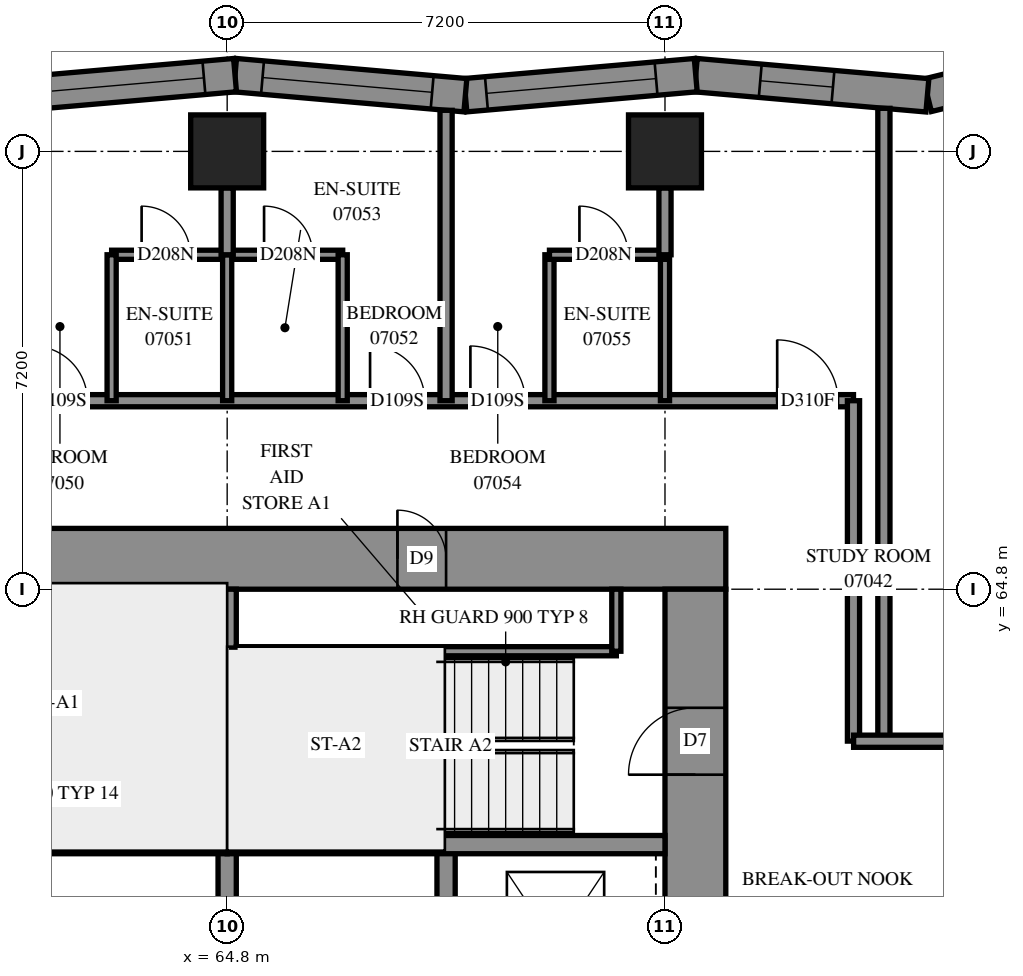
"""IFC4 building model, lengths in metres.
Left out: names, types, materials, properties, quantities, classifications, styles, units other than length and angle.
Written with IfcOpenShell. Run it as: python <this file> out.ifc"""

import sys

from ifc_helpers import new_model, si_unit, direction, frame, frame_2d, origin, origin_2d, place, context, subcontext, project, spatial, polyline, rectangle, outline, extrude, element, fill, save


model = new_model("IFC4")
c1 = context("Model", 3, precision=1e-05, world=origin(), true_north=direction((0.0, 1.0)))
c2 = subcontext(c1, "Body", "Model", "MODEL_VIEW")
j1 = project(units=[si_unit("LENGTHUNIT", "METRE"), si_unit("PLANEANGLEUNIT", "RADIAN")], contexts=[c1])
p1 = place(None, origin())
s1 = spatial("IfcSite", under=j1, at=p1, CompositionType="ELEMENT")
p2 = place(p1, origin())
s2 = spatial("IfcBuilding", under=s1, at=p2, CompositionType="ELEMENT")
p3 = place(p2, frame((0.0, 0.0, 30.4)))
s3 = spatial("IfcBuildingStorey", under=s2, at=p3, CompositionType="ELEMENT", Elevation=30.4)
for number, where, z_axis, x_axis in (
    (1, (64.8, 72.0, 0.0), (0.0, 0.0, 1.0), (1.0, 0.0, 0.0)),
    (2, (72.0, 72.0, 0.0), (0.0, 0.0, 1.0), (1.0, 0.0, 0.0)),
):
    element("IfcColumn", number, at=place(p3, frame(where, z_axis=z_axis, x_axis=x_axis)), inside=s3, PredefinedType="COLUMN", context=c2, shape_type="SweptSolid", body=[
        extrude(rectangle(XDim=1.2, YDim=1.2, at=origin_2d()), origin(), (0.0, 0.0, 1.0), 3.1),
    ])
p4 = place(p3, frame((56.6, 65.3, -0.3), z_axis=(0.0, 0.0, 1.0), x_axis=(1.0, 0.0, 0.0)))
e3 = element("IfcWall", 3, at=p4, inside=s3, PredefinedType="SHEAR", context=c2, shape_type="SweptSolid", body=[
    extrude(rectangle(XDim=16.4, YDim=1.0, at=frame_2d((8.2, 0.0))), origin(), (0.0, 0.0, 1.0), 2.7),
])
p5 = place(p4, frame((11.0, 0.0, 0.3)))
e4 = element("IfcOpeningElement", 4, at=p5, cuts=e3, PredefinedType="OPENING", context=c2, shape_type="SweptSolid", body=[
    extrude(rectangle(XDim=0.8, YDim=2.1, at=frame_2d((0.4, 1.05))), frame((0.0, 0.51, 0.0), z_axis=(0.0, -1.0, 0.0), x_axis=(1.0, 0.0, 0.0)), (0.0, 0.0, 1.0), 1.02),
])
p6 = place(p3, frame((72.5, 50.4, -0.3), z_axis=(0.0, 0.0, 1.0), x_axis=(0.0, 1.0, 0.0)))
e5 = element("IfcWall", 5, at=p6, inside=s3, PredefinedType="SHEAR", context=c2, shape_type="SweptSolid", body=[
    extrude(rectangle(XDim=14.4, YDim=1.0, at=frame_2d((7.2, 0.0))), origin(), (0.0, 0.0, 1.0), 2.7),
])
p7 = place(p6, frame((4.55, 0.0, 0.3)))
e6 = element("IfcOpeningElement", 6, at=p7, cuts=e5, PredefinedType="OPENING", context=c2, shape_type="SweptSolid", body=[
    extrude(rectangle(XDim=1.1, YDim=2.1, at=frame_2d((0.55, 1.05))), frame((0.0, 0.51, 0.0), z_axis=(0.0, -1.0, 0.0), x_axis=(1.0, 0.0, 0.0)), (0.0, 0.0, 1.0), 1.02),
])
p8 = place(p6, frame((11.35, 0.0, 0.3)))
e7 = element("IfcOpeningElement", 7, at=p8, cuts=e5, PredefinedType="OPENING", context=c2, shape_type="SweptSolid", body=[
    extrude(rectangle(XDim=1.1, YDim=2.1, at=frame_2d((0.55, 1.05))), frame((0.0, 0.51, 0.0), z_axis=(0.0, -1.0, 0.0), x_axis=(1.0, 0.0, 0.0)), (0.0, 0.0, 1.0), 1.02),
])
for number, where, z_axis, x_axis in (
    (8, (64.8, 57.3, 0.0), (0.0, 0.0, 1.0), (0.0, 1.0, 0.0)),
    (9, (68.4, 57.3, 0.0), (0.0, 0.0, 1.0), (0.0, 1.0, 0.0)),
):
    element("IfcWall", number, at=place(p3, frame(where, z_axis=z_axis, x_axis=x_axis)), inside=s3, PredefinedType="SOLIDWALL", context=c2, shape_type="SweptSolid", body=[
        extrude(rectangle(XDim=3.3, YDim=0.3, at=frame_2d((1.65, 0.0))), origin(), (0.0, 0.0, 1.0), 3.1),
    ])
for number, where, z_axis, x_axis in (
    (10, (57.6, 60.6, 0.0), (0.0, 0.0, 1.0), (1.0, 0.0, 0.0)),
    (11, (64.8, 60.6, 0.0), (0.0, 0.0, 1.0), (1.0, 0.0, 0.0)),
):
    element("IfcWall", number, at=place(p3, frame(where, z_axis=z_axis, x_axis=x_axis)), inside=s3, PredefinedType="SOLIDWALL", context=c2, shape_type="SweptSolid", body=[
        extrude(rectangle(XDim=7.2, YDim=0.3, at=frame_2d((3.6, 0.0))), origin(), (0.0, 0.0, 1.0), 3.1),
    ])
p9 = place(p3, frame((64.8, 60.6, 0.0), z_axis=(0.0, 0.0, 1.0), x_axis=(0.0, 1.0, 0.0)))
e12 = element("IfcWall", 12, at=p9, inside=s3, PredefinedType="SOLIDWALL", context=c2, shape_type="SweptSolid", body=[
    extrude(rectangle(XDim=4.2, YDim=0.3, at=frame_2d((2.1, 0.0))), origin(), (0.0, 0.0, 1.0), 3.1),
])
p10 = place(p3, frame((76.301, 49.443, -0.3), z_axis=(0.0, 0.0, 1.0), x_axis=(0.7071067812, 0.7071067812, 0.0)))
e13 = element("IfcWall", 13, at=p10, inside=s3, PredefinedType="SHEAR", context=c2, shape_type="SweptSolid", body=[
    extrude(rectangle(XDim=14.4, YDim=1.0, at=frame_2d((7.2, 0.0))), origin(), (0.0, 0.0, 1.0), 2.7),
])
p11 = place(p10, frame((4.55, 0.0, 0.3)))
e14 = element("IfcOpeningElement", 14, at=p11, cuts=e13, PredefinedType="OPENING", context=c2, shape_type="SweptSolid", body=[
    extrude(rectangle(XDim=1.1, YDim=2.1, at=frame_2d((0.55, 1.05))), frame((0.0, 0.51, 0.0), z_axis=(0.0, -1.0, 0.0), x_axis=(1.0, 0.0, 0.0)), (0.0, 0.0, 1.0), 1.02),
])
p12 = place(p10, frame((11.35, 0.0, 0.3)))
e15 = element("IfcOpeningElement", 15, at=p12, cuts=e13, PredefinedType="OPENING", context=c2, shape_type="SweptSolid", body=[
    extrude(rectangle(XDim=1.1, YDim=2.1, at=frame_2d((0.55, 1.05))), frame((0.0, 0.51, 0.0), z_axis=(0.0, -1.0, 0.0), x_axis=(1.0, 0.0, 0.0)), (0.0, 0.0, 1.0), 1.02),
])
p13 = place(p3, frame((79.947, 73.814, 0.0), z_axis=(0.0, 0.0, 1.0), x_axis=(-0.9711610885, -0.2384242862, 0.0)))
e16 = element("IfcWall", 16, at=p13, inside=s3, PredefinedType="SOLIDWALL", context=c2, shape_type="SweptSolid", body=[
    extrude(outline(polyline([(-0.207, -0.275), (3.694, -0.275), (3.785, 0.275), (0.207, 0.275), (-0.207, -0.275)])), origin(), (0.0, 0.0, 1.0), 3.1),
])
p14 = place(p13, frame((1.554, 0.0, 0.5)))
e17 = element("IfcOpeningElement", 17, at=p14, cuts=e16, PredefinedType="OPENING", context=c2, shape_type="SweptSolid", body=[
    extrude(rectangle(XDim=1.2, YDim=2.45, at=frame_2d((0.6, 1.225))), frame((0.0, 0.285, 0.0), z_axis=(0.0, -1.0, 0.0), x_axis=(1.0, 0.0, 0.0)), (0.0, 0.0, 1.0), 0.57),
])
p15 = place(p3, frame((76.316, 72.922, 0.0), z_axis=(0.0, 0.0, 1.0), x_axis=(-0.9962265436, 0.0867909782, 0.0)))
e18 = element("IfcWall", 18, at=p15, inside=s3, PredefinedType="SOLIDWALL", context=c2, shape_type="SweptSolid", body=[
    extrude(outline(polyline([(0.045, -0.275), (3.848, -0.275), (3.8, 0.275), (-0.045, 0.275), (0.045, -0.275)])), origin(), (0.0, 0.0, 1.0), 3.1),
])
p16 = place(p15, frame((1.559, 0.0, 0.5)))
e19 = element("IfcOpeningElement", 19, at=p16, cuts=e18, PredefinedType="OPENING", context=c2, shape_type="SweptSolid", body=[
    extrude(rectangle(XDim=1.2, YDim=2.45, at=frame_2d((0.6, 1.225))), frame((0.0, 0.285, 0.0), z_axis=(0.0, -1.0, 0.0), x_axis=(1.0, 0.0, 0.0)), (0.0, 0.0, 1.0), 0.57),
])
p17 = place(p3, frame((72.506, 73.254, 0.0), z_axis=(0.0, 0.0, 1.0), x_axis=(-0.9962273538, -0.0867816769, 0.0)))
e20 = element("IfcWall", 20, at=p17, inside=s3, PredefinedType="SOLIDWALL", context=c2, shape_type="SweptSolid", body=[
    extrude(outline(polyline([(-0.024, -0.275), (3.779, -0.275), (3.827, 0.275), (0.024, 0.275), (-0.024, -0.275)])), origin(), (0.0, 0.0, 1.0), 3.1),
])
p18 = place(p17, frame((0.655, 0.0, 0.5)))
e21 = element("IfcOpeningElement", 21, at=p18, cuts=e20, PredefinedType="OPENING", context=c2, shape_type="SweptSolid", body=[
    extrude(rectangle(XDim=2.8, YDim=2.45, at=frame_2d((1.4, 1.225))), frame((0.0, 0.285, 0.0), z_axis=(0.0, -1.0, 0.0), x_axis=(1.0, 0.0, 0.0)), (0.0, 0.0, 1.0), 0.57),
])
p19 = place(p3, frame((68.718, 72.924, 0.0), z_axis=(0.0, 0.0, 1.0), x_axis=(-0.9962273538, 0.0867816769, 0.0)))
e22 = element("IfcWall", 22, at=p19, inside=s3, PredefinedType="SOLIDWALL", context=c2, shape_type="SweptSolid", body=[
    extrude(outline(polyline([(0.024, -0.275), (3.827, -0.275), (3.779, 0.275), (-0.024, 0.275), (0.024, -0.275)])), origin(), (0.0, 0.0, 1.0), 3.1),
])
p20 = place(p19, frame((0.549, 0.0, 0.5)))
e23 = element("IfcOpeningElement", 23, at=p20, cuts=e22, PredefinedType="OPENING", context=c2, shape_type="SweptSolid", body=[
    extrude(rectangle(XDim=2.8, YDim=2.45, at=frame_2d((1.4, 1.225))), frame((0.0, 0.285, 0.0), z_axis=(0.0, -1.0, 0.0), x_axis=(1.0, 0.0, 0.0)), (0.0, 0.0, 1.0), 0.57),
])
p21 = place(p3, frame((64.929, 73.254, 0.0), z_axis=(0.0, 0.0, 1.0), x_axis=(-0.9962271558, -0.0867839505, 0.0)))
e24 = element("IfcWall", 24, at=p21, inside=s3, PredefinedType="SOLIDWALL", context=c2, shape_type="SweptSolid", body=[
    extrude(outline(polyline([(-0.024, -0.275), (3.779, -0.275), (3.827, 0.275), (0.024, 0.275), (-0.024, -0.275)])), origin(), (0.0, 0.0, 1.0), 3.1),
])
p22 = place(p21, frame((0.513, 0.0, 0.5)))
e25 = element("IfcOpeningElement", 25, at=p22, cuts=e24, PredefinedType="OPENING", context=c2, shape_type="SweptSolid", body=[
    extrude(rectangle(XDim=2.8, YDim=2.45, at=frame_2d((1.4, 1.225))), frame((0.0, 0.285, 0.0), z_axis=(0.0, -1.0, 0.0), x_axis=(1.0, 0.0, 0.0)), (0.0, 0.0, 1.0), 0.57),
])
p23 = place(p3, frame((64.95, 63.78, 0.0), z_axis=(0.0, 0.0, 1.0), x_axis=(1.0, 0.0, 0.0)))
e26 = element("IfcWall", 26, at=p23, inside=s3, PredefinedType="PARTITIONING", context=c2, shape_type="SweptSolid", body=[
    extrude(rectangle(XDim=6.25, YDim=0.15, at=frame_2d((3.125, 0.0))), origin(), (0.0, 0.0, 1.0), 3.1),
])
p24 = place(p3, frame((71.2, 63.78, 0.0), z_axis=(0.0, 0.0, 1.0), x_axis=(0.0, 1.0, 0.0)))
e27 = element("IfcWall", 27, at=p24, inside=s3, PredefinedType="PARTITIONING", context=c2, shape_type="SweptSolid", body=[
    extrude(rectangle(XDim=1.02, YDim=0.15, at=frame_2d((0.51, 0.0))), origin(), (0.0, 0.0, 1.0), 3.1),
])
p25 = place(p3, frame((54.5, 67.9, 0.0), z_axis=(0.0, 0.0, 1.0), x_axis=(1.0, 0.0, 0.0)))
e28 = element("IfcWall", 28, at=p25, inside=s3, PredefinedType="PARTITIONING", context=c2, shape_type="SweptSolid", body=[
    extrude(rectangle(XDim=20.6, YDim=0.2, at=frame_2d((10.3, 0.0))), origin(), (0.0, 0.0, 1.0), 3.1),
])
p26 = place(p25, frame((0.255, 0.0, 0.0)))
e29 = element("IfcOpeningElement", 29, at=p26, cuts=e28, PredefinedType="OPENING", context=c2, shape_type="SweptSolid", body=[
    extrude(rectangle(XDim=1.0, YDim=2.1, at=frame_2d((0.5, 1.05))), frame((0.0, 0.11, 0.0), z_axis=(0.0, -1.0, 0.0), x_axis=(1.0, 0.0, 0.0)), (0.0, 0.0, 1.0), 0.22),
])
p27 = place(p25, frame((19.345, 0.0, 0.0)))
e30 = element("IfcOpeningElement", 30, at=p27, cuts=e28, PredefinedType="OPENING", context=c2, shape_type="SweptSolid", body=[
    extrude(rectangle(XDim=1.0, YDim=2.1, at=frame_2d((0.5, 1.05))), frame((0.0, 0.11, 0.0), z_axis=(0.0, -1.0, 0.0), x_axis=(1.0, 0.0, 0.0)), (0.0, 0.0, 1.0), 0.22),
])
p28 = place(p25, frame((5.45, 0.0, 0.0)))
e31 = element("IfcOpeningElement", 31, at=p28, cuts=e28, PredefinedType="OPENING", context=c2, shape_type="SweptSolid", body=[
    extrude(rectangle(XDim=0.9, YDim=2.1, at=frame_2d((0.45, 1.05))), frame((0.0, 0.11, 0.0), z_axis=(0.0, -1.0, 0.0), x_axis=(1.0, 0.0, 0.0)), (0.0, 0.0, 1.0), 0.22),
])
p29 = place(p25, frame((7.1, 0.0, 0.0)))
e32 = element("IfcOpeningElement", 32, at=p29, cuts=e28, PredefinedType="OPENING", context=c2, shape_type="SweptSolid", body=[
    extrude(rectangle(XDim=0.9, YDim=2.1, at=frame_2d((0.45, 1.05))), frame((0.0, 0.11, 0.0), z_axis=(0.0, -1.0, 0.0), x_axis=(1.0, 0.0, 0.0)), (0.0, 0.0, 1.0), 0.22),
])
p30 = place(p25, frame((12.65, 0.0, 0.0)))
e33 = element("IfcOpeningElement", 33, at=p30, cuts=e28, PredefinedType="OPENING", context=c2, shape_type="SweptSolid", body=[
    extrude(rectangle(XDim=0.9, YDim=2.1, at=frame_2d((0.45, 1.05))), frame((0.0, 0.11, 0.0), z_axis=(0.0, -1.0, 0.0), x_axis=(1.0, 0.0, 0.0)), (0.0, 0.0, 1.0), 0.22),
])
p31 = place(p25, frame((14.3, 0.0, 0.0)))
e34 = element("IfcOpeningElement", 34, at=p31, cuts=e28, PredefinedType="OPENING", context=c2, shape_type="SweptSolid", body=[
    extrude(rectangle(XDim=0.9, YDim=2.1, at=frame_2d((0.45, 1.05))), frame((0.0, 0.11, 0.0), z_axis=(0.0, -1.0, 0.0), x_axis=(1.0, 0.0, 0.0)), (0.0, 0.0, 1.0), 0.22),
])
p32 = place(p3, frame((75.6, 62.3, 0.0), z_axis=(0.0, 0.0, 1.0), x_axis=(0.0, 1.0, 0.0)))
e35 = element("IfcWall", 35, at=p32, inside=s3, PredefinedType="PARTITIONING", context=c2, shape_type="SweptSolid", body=[
    extrude(rectangle(XDim=10.408, YDim=0.2, at=frame_2d((5.204, 0.0))), origin(), (0.0, 0.0, 1.0), 3.1),
])
p33 = place(p3, frame((75.1, 62.302, 0.0), z_axis=(0.0, 0.0, 1.0), x_axis=(0.0, 1.0, 0.0)))
e36 = element("IfcWall", 36, at=p33, inside=s3, PredefinedType="PARTITIONING", context=c2, shape_type="SweptSolid", body=[
    extrude(rectangle(XDim=5.598, YDim=0.2, at=frame_2d((2.799, 0.0))), origin(), (0.0, 0.0, 1.0), 3.1),
])
p34 = place(p3, frame((68.4, 67.9, 0.0), z_axis=(0.0, 0.0, 1.0), x_axis=(0.0, 1.0, 0.0)))
e37 = element("IfcWall", 37, at=p34, inside=s3, PredefinedType="PARTITIONING", context=c2, shape_type="SweptSolid", body=[
    extrude(rectangle(XDim=4.776, YDim=0.2, at=frame_2d((2.388, 0.0))), origin(), (0.0, 0.0, 1.0), 3.1),
])
p35 = place(p3, frame((75.102, 62.3, 0.0), z_axis=(0.0, 0.0, 1.0), x_axis=(1.0, 0.0, 0.0)))
e38 = element("IfcWall", 38, at=p35, inside=s3, PredefinedType="PARTITIONING", context=c2, shape_type="SweptSolid", body=[
    extrude(rectangle(XDim=4.098, YDim=0.2, at=frame_2d((2.049, 0.0))), origin(), (0.0, 0.0, 1.0), 3.1),
])
p36 = place(p3, frame((62.9, 70.3, 0.0), z_axis=(0.0, 0.0, 1.0), x_axis=(1.0, 0.0, 0.0)))
e39 = element("IfcWall", 39, at=p36, inside=s3, PredefinedType="PARTITIONING", context=c2, shape_type="SweptSolid", body=[
    extrude(rectangle(XDim=3.8, YDim=0.15, at=frame_2d((1.9, 0.0))), origin(), (0.0, 0.0, 1.0), 3.1),
])
p37 = place(p36, frame((0.493, 0.0, 0.0)))
e40 = element("IfcOpeningElement", 40, at=p37, cuts=e39, PredefinedType="OPENING", context=c2, shape_type="SweptSolid", body=[
    extrude(rectangle(XDim=0.8, YDim=2.1, at=frame_2d((0.4, 1.05))), frame((0.0, 0.085, 0.0), z_axis=(0.0, -1.0, 0.0), x_axis=(1.0, 0.0, 0.0)), (0.0, 0.0, 1.0), 0.17),
])
p38 = place(p36, frame((2.507, 0.0, 0.0)))
e41 = element("IfcOpeningElement", 41, at=p38, cuts=e39, PredefinedType="OPENING", context=c2, shape_type="SweptSolid", body=[
    extrude(rectangle(XDim=0.8, YDim=2.1, at=frame_2d((0.4, 1.05))), frame((0.0, 0.085, 0.0), z_axis=(0.0, -1.0, 0.0), x_axis=(1.0, 0.0, 0.0)), (0.0, 0.0, 1.0), 0.17),
])
for number, where, z_axis, x_axis in (
    (42, (62.9, 67.9, 0.0), (0.0, 0.0, 1.0), (0.0, 1.0, 0.0)),
    (43, (66.7, 67.9, 0.0), (0.0, 0.0, 1.0), (0.0, 1.0, 0.0)),
    (44, (64.8, 67.9, 0.0), (0.0, 0.0, 1.0), (0.0, 1.0, 0.0)),
    (45, (70.1, 67.9, 0.0), (0.0, 0.0, 1.0), (0.0, 1.0, 0.0)),
    (46, (72.0, 67.9, 0.0), (0.0, 0.0, 1.0), (0.0, 1.0, 0.0)),
):
    element("IfcWall", number, at=place(p3, frame(where, z_axis=z_axis, x_axis=x_axis)), inside=s3, PredefinedType="PARTITIONING", context=c2, shape_type="SweptSolid", body=[
        extrude(rectangle(XDim=2.4, YDim=0.15, at=frame_2d((1.2, 0.0))), origin(), (0.0, 0.0, 1.0), 3.1),
    ])
p39 = place(p3, frame((70.1, 70.3, 0.0), z_axis=(0.0, 0.0, 1.0), x_axis=(1.0, 0.0, 0.0)))
e47 = element("IfcWall", 47, at=p39, inside=s3, PredefinedType="PARTITIONING", context=c2, shape_type="SweptSolid", body=[
    extrude(rectangle(XDim=1.9, YDim=0.15, at=frame_2d((0.95, 0.0))), origin(), (0.0, 0.0, 1.0), 3.1),
])
p40 = place(p39, frame((0.493, 0.0, 0.0)))
e48 = element("IfcOpeningElement", 48, at=p40, cuts=e47, PredefinedType="OPENING", context=c2, shape_type="SweptSolid", body=[
    extrude(rectangle(XDim=0.8, YDim=2.1, at=frame_2d((0.4, 1.05))), frame((0.0, 0.085, 0.0), z_axis=(0.0, -1.0, 0.0), x_axis=(1.0, 0.0, 0.0)), (0.0, 0.0, 1.0), 0.17),
])
for number, where, z_axis, x_axis in (
    (49, (64.8, 70.3, 0.0), (0.0, 0.0, 1.0), (0.0, 1.0, 0.0)),
    (50, (72.0, 70.3, 0.0), (0.0, 0.0, 1.0), (0.0, 1.0, 0.0)),
):
    element("IfcWall", number, at=place(p3, frame(where, z_axis=z_axis, x_axis=x_axis)), inside=s3, PredefinedType="PARTITIONING", context=c2, shape_type="SweptSolid", body=[
        extrude(rectangle(XDim=1.1, YDim=0.2, at=frame_2d((0.55, 0.0))), origin(), (0.0, 0.0, 1.0), 3.1),
    ])
p41 = place(p16, origin())
e51 = element("IfcWindow", 51, at=p41, inside=s3, PartitioningType="SINGLE_PANEL", PredefinedType="WINDOW", context=c2, shape_type="SweptSolid", body=[
    extrude(rectangle(XDim=1.2, YDim=2.45, at=frame_2d((0.6, 1.225))), frame((0.0, 0.155, 0.0), z_axis=(0.0, -1.0, 0.0), x_axis=(1.0, 0.0, 0.0)), (0.0, 0.0, 1.0), 0.06),
])
fill(e19, e51)
p42 = place(p18, origin())
e52 = element("IfcWindow", 52, at=p42, inside=s3, PartitioningType="SINGLE_PANEL", PredefinedType="WINDOW", context=c2, shape_type="SweptSolid", body=[
    extrude(rectangle(XDim=2.8, YDim=2.45, at=frame_2d((1.4, 1.225))), frame((0.0, 0.155, 0.0), z_axis=(0.0, -1.0, 0.0), x_axis=(1.0, 0.0, 0.0)), (0.0, 0.0, 1.0), 0.06),
])
fill(e21, e52)
p43 = place(p20, origin())
e53 = element("IfcWindow", 53, at=p43, inside=s3, PartitioningType="SINGLE_PANEL", PredefinedType="WINDOW", context=c2, shape_type="SweptSolid", body=[
    extrude(rectangle(XDim=2.8, YDim=2.45, at=frame_2d((1.4, 1.225))), frame((0.0, 0.155, 0.0), z_axis=(0.0, -1.0, 0.0), x_axis=(1.0, 0.0, 0.0)), (0.0, 0.0, 1.0), 0.06),
])
fill(e23, e53)
p44 = place(p22, origin())
e54 = element("IfcWindow", 54, at=p44, inside=s3, PartitioningType="SINGLE_PANEL", PredefinedType="WINDOW", context=c2, shape_type="SweptSolid", body=[
    extrude(rectangle(XDim=2.8, YDim=2.45, at=frame_2d((1.4, 1.225))), frame((0.0, 0.155, 0.0), z_axis=(0.0, -1.0, 0.0), x_axis=(1.0, 0.0, 0.0)), (0.0, 0.0, 1.0), 0.06),
])
fill(e25, e54)
p45 = place(p5, origin())
e55 = element("IfcDoor", 55, at=p45, inside=s3, OperationType="SINGLE_SWING_RIGHT", PredefinedType="DOOR", context=c2, shape_type="SweptSolid", body=[
    extrude(rectangle(XDim=0.8, YDim=2.1, at=frame_2d((0.4, 1.05))), frame((0.0, -0.44, 0.0), z_axis=(0.0, -1.0, 0.0), x_axis=(1.0, 0.0, 0.0)), (0.0, 0.0, 1.0), 0.05),
])
fill(e4, e55)
p46 = place(p8, origin())
e56 = element("IfcDoor", 56, at=p46, inside=s3, OperationType="SINGLE_SWING_RIGHT", PredefinedType="DOOR", context=c2, shape_type="SweptSolid", body=[
    extrude(rectangle(XDim=1.1, YDim=2.1, at=frame_2d((0.55, 1.05))), frame((0.0, 0.025, 0.0), z_axis=(0.0, -1.0, 0.0), x_axis=(1.0, 0.0, 0.0)), (0.0, 0.0, 1.0), 0.05),
])
fill(e7, e56)
p47 = place(p27, origin())
e57 = element("IfcDoor", 57, at=p47, inside=s3, OperationType="SINGLE_SWING_RIGHT", PredefinedType="DOOR", context=c2, shape_type="SweptSolid", body=[
    extrude(rectangle(XDim=1.0, YDim=2.1, at=frame_2d((0.5, 1.05))), frame((0.0, 0.025, 0.0), z_axis=(0.0, -1.0, 0.0), x_axis=(1.0, 0.0, 0.0)), (0.0, 0.0, 1.0), 0.05),
])
fill(e30, e57)
p48 = place(p29, origin())
e58 = element("IfcDoor", 58, at=p48, inside=s3, OperationType="SINGLE_SWING_LEFT", PredefinedType="DOOR", context=c2, shape_type="SweptSolid", body=[
    extrude(rectangle(XDim=0.9, YDim=2.1, at=frame_2d((0.45, 1.05))), frame((0.0, 0.025, 0.0), z_axis=(0.0, -1.0, 0.0), x_axis=(1.0, 0.0, 0.0)), (0.0, 0.0, 1.0), 0.05),
])
fill(e32, e58)
p49 = place(p37, origin())
e59 = element("IfcDoor", 59, at=p49, inside=s3, OperationType="SINGLE_SWING_RIGHT", PredefinedType="DOOR", context=c2, shape_type="SweptSolid", body=[
    extrude(rectangle(XDim=0.8, YDim=2.1, at=frame_2d((0.4, 1.05))), frame((0.0, 0.025, 0.0), z_axis=(0.0, -1.0, 0.0), x_axis=(1.0, 0.0, 0.0)), (0.0, 0.0, 1.0), 0.05),
])
fill(e40, e59)
p50 = place(p30, origin())
e60 = element("IfcDoor", 60, at=p50, inside=s3, OperationType="SINGLE_SWING_RIGHT", PredefinedType="DOOR", context=c2, shape_type="SweptSolid", body=[
    extrude(rectangle(XDim=0.9, YDim=2.1, at=frame_2d((0.45, 1.05))), frame((0.0, 0.025, 0.0), z_axis=(0.0, -1.0, 0.0), x_axis=(1.0, 0.0, 0.0)), (0.0, 0.0, 1.0), 0.05),
])
fill(e33, e60)
p51 = place(p38, origin())
e61 = element("IfcDoor", 61, at=p51, inside=s3, OperationType="SINGLE_SWING_RIGHT", PredefinedType="DOOR", context=c2, shape_type="SweptSolid", body=[
    extrude(rectangle(XDim=0.8, YDim=2.1, at=frame_2d((0.4, 1.05))), frame((0.0, 0.025, 0.0), z_axis=(0.0, -1.0, 0.0), x_axis=(1.0, 0.0, 0.0)), (0.0, 0.0, 1.0), 0.05),
])
fill(e41, e61)
p52 = place(p31, origin())
e62 = element("IfcDoor", 62, at=p52, inside=s3, OperationType="SINGLE_SWING_LEFT", PredefinedType="DOOR", context=c2, shape_type="SweptSolid", body=[
    extrude(rectangle(XDim=0.9, YDim=2.1, at=frame_2d((0.45, 1.05))), frame((0.0, 0.025, 0.0), z_axis=(0.0, -1.0, 0.0), x_axis=(1.0, 0.0, 0.0)), (0.0, 0.0, 1.0), 0.05),
])
fill(e34, e62)
p53 = place(p40, origin())
e63 = element("IfcDoor", 63, at=p53, inside=s3, OperationType="SINGLE_SWING_RIGHT", PredefinedType="DOOR", context=c2, shape_type="SweptSolid", body=[
    extrude(rectangle(XDim=0.8, YDim=2.1, at=frame_2d((0.4, 1.05))), frame((0.0, 0.025, 0.0), z_axis=(0.0, -1.0, 0.0), x_axis=(1.0, 0.0, 0.0)), (0.0, 0.0, 1.0), 0.05),
])
fill(e48, e63)
save(model, sys.argv[1])
